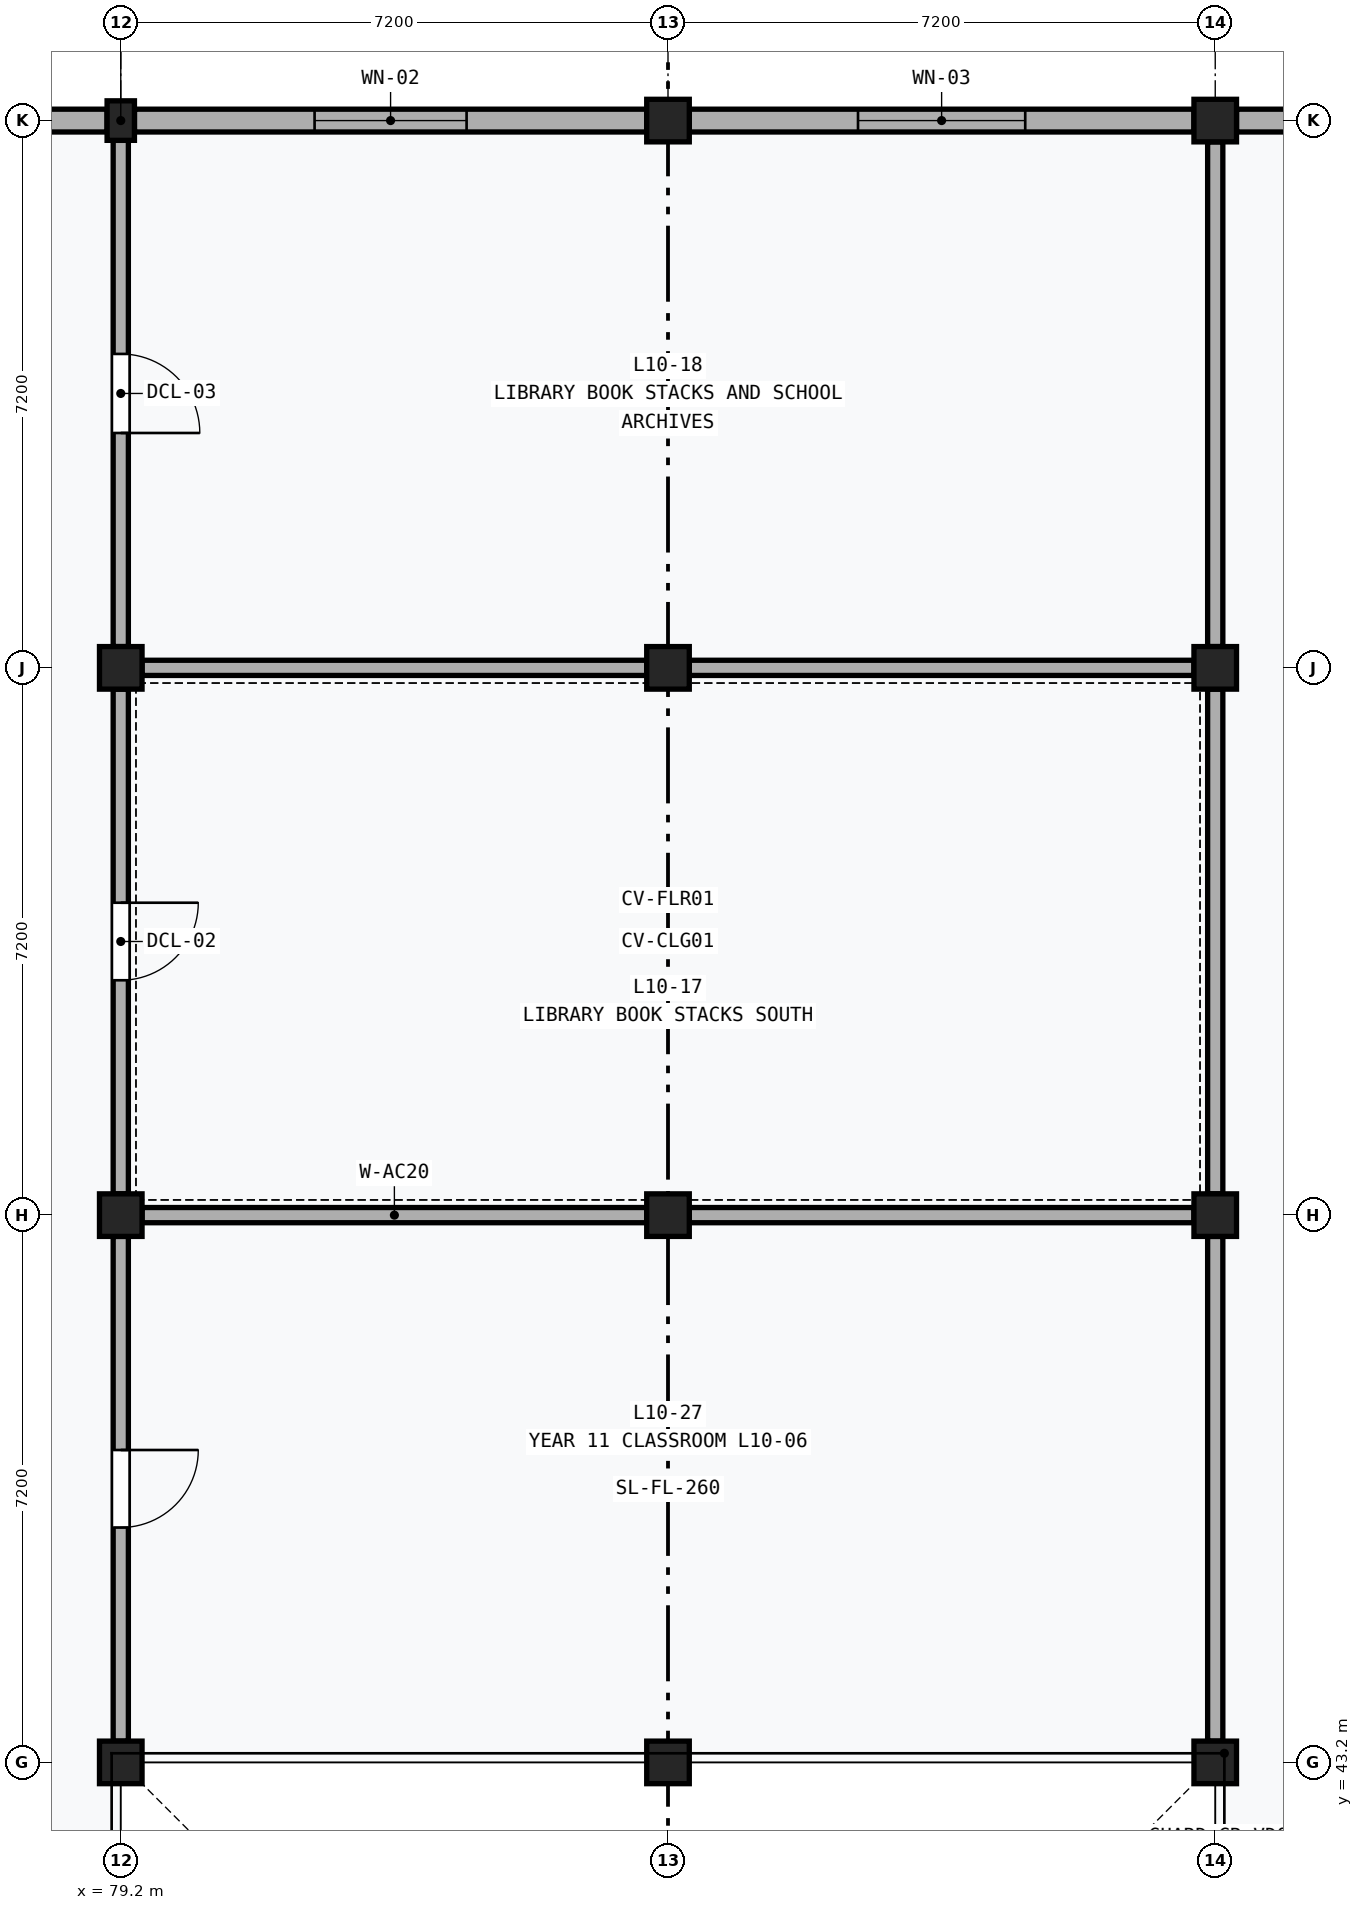
"""IFC4 building model, lengths in metres.
Left out: names, types, materials, properties, quantities, classifications, styles, units other than length and angle.
Written with IfcOpenShell. Run it as: python <this file> out.ifc"""

import sys

from ifc_helpers import new_model, si_unit, direction, frame, frame_2d, origin, origin_2d, place, context, subcontext, project, spatial, rectangle, extrude, element, fill, save


model = new_model("IFC4")
c1 = context("Model", 3, precision=1e-05, world=origin(), true_north=direction((0.0, 1.0)))
c2 = subcontext(c1, "Body", "Model", "MODEL_VIEW")
j1 = project(units=[si_unit("LENGTHUNIT", "METRE"), si_unit("PLANEANGLEUNIT", "RADIAN")], contexts=[c1])
p1 = place(None, origin())
s1 = spatial("IfcSite", under=j1, at=p1, CompositionType="ELEMENT")
p2 = place(p1, origin())
s2 = spatial("IfcBuilding", under=s1, at=p2, CompositionType="ELEMENT")
p3 = place(p2, frame((0.0, 0.0, 42.8)))
s3 = spatial("IfcBuildingStorey", under=s2, at=p3, CompositionType="ELEMENT", Elevation=42.8)
for number, where, z_axis, x_axis in (
    (1, (79.2, 43.2, 0.0), (0.0, 0.0, 1.0), (1.0, 0.0, 0.0)),
    (2, (79.2, 50.4, 0.0), (0.0, 0.0, 1.0), (1.0, 0.0, 0.0)),
    (3, (79.2, 57.6, 0.0), (0.0, 0.0, 1.0), (1.0, 0.0, 0.0)),
):
    element("IfcColumn", number, at=place(p3, frame(where, z_axis=z_axis, x_axis=x_axis)), inside=s3, PredefinedType="COLUMN", context=c2, shape_type="SweptSolid", body=[
        extrude(rectangle(XDim=0.56, YDim=0.56, at=origin_2d()), origin(), (0.0, 0.0, 1.0), 4.0),
    ])
p4 = place(p3, frame((79.2, 64.8, 0.0), z_axis=(0.0, 0.0, 1.0), x_axis=(1.0, 0.0, 0.0)))
e4 = element("IfcColumn", 4, at=p4, inside=s3, PredefinedType="PILASTER", context=c2, shape_type="SweptSolid", body=[
    extrude(rectangle(XDim=0.36, YDim=0.52, at=origin_2d()), origin(), (0.0, 0.0, 1.0), 4.0),
])
for number, where, z_axis, x_axis in (
    (5, (86.4, 43.2, 0.0), (0.0, 0.0, 1.0), (1.0, 0.0, 0.0)),
    (6, (86.4, 50.4, 0.0), (0.0, 0.0, 1.0), (1.0, 0.0, 0.0)),
    (7, (86.4, 57.6, 0.0), (0.0, 0.0, 1.0), (1.0, 0.0, 0.0)),
    (8, (86.4, 64.8, 0.0), (0.0, 0.0, 1.0), (1.0, 0.0, 0.0)),
    (9, (93.6, 43.2, 0.0), (0.0, 0.0, 1.0), (1.0, 0.0, 0.0)),
    (10, (93.6, 50.4, 0.0), (0.0, 0.0, 1.0), (1.0, 0.0, 0.0)),
    (11, (93.6, 57.6, 0.0), (0.0, 0.0, 1.0), (1.0, 0.0, 0.0)),
    (12, (93.6, 64.8, 0.0), (0.0, 0.0, 1.0), (1.0, 0.0, 0.0)),
):
    element("IfcColumn", number, at=place(p3, frame(where, z_axis=z_axis, x_axis=x_axis)), inside=s3, PredefinedType="COLUMN", context=c2, shape_type="SweptSolid", body=[
        extrude(rectangle(XDim=0.56, YDim=0.56, at=origin_2d()), origin(), (0.0, 0.0, 1.0), 4.0),
    ])
p5 = place(p3, frame((72.28, 64.8, 0.0), z_axis=(0.0, 0.0, 1.0), x_axis=(1.0, 0.0, 0.0)))
e13 = element("IfcWall", 13, at=p5, inside=s3, PredefinedType="SOLIDWALL", context=c2, shape_type="SweptSolid", body=[
    extrude(rectangle(XDim=6.74, YDim=0.3, at=frame_2d((3.37, 0.0))), origin(), (0.0, 0.0, 1.0), 3.18),
])
p6 = place(p5, frame((2.47, 0.0, 0.9)))
e14 = element("IfcOpeningElement", 14, at=p6, cuts=e13, PredefinedType="OPENING", context=c2, shape_type="SweptSolid", body=[
    extrude(rectangle(XDim=1.8, YDim=1.8, at=frame_2d((0.9, 0.9))), frame((0.0, 0.162, 0.0), z_axis=(0.0, -1.0, 0.0), x_axis=(1.0, 0.0, 0.0)), (0.0, 0.0, 1.0), 0.324),
])
p7 = place(p3, frame((79.38, 64.8, 0.0), z_axis=(0.0, 0.0, 1.0), x_axis=(1.0, 0.0, 0.0)))
e15 = element("IfcWall", 15, at=p7, inside=s3, PredefinedType="SOLIDWALL", context=c2, shape_type="SweptSolid", body=[
    extrude(rectangle(XDim=6.74, YDim=0.3, at=frame_2d((3.37, 0.0))), origin(), (0.0, 0.0, 1.0), 3.18),
])
p8 = place(p7, frame((2.37, 0.0, 0.9)))
e16 = element("IfcOpeningElement", 16, at=p8, cuts=e15, PredefinedType="OPENING", context=c2, shape_type="SweptSolid", body=[
    extrude(rectangle(XDim=2.0, YDim=1.8, at=frame_2d((1.0, 0.9))), frame((0.0, 0.162, 0.0), z_axis=(0.0, -1.0, 0.0), x_axis=(1.0, 0.0, 0.0)), (0.0, 0.0, 1.0), 0.324),
])
p9 = place(p3, frame((86.68, 64.8, 0.0), z_axis=(0.0, 0.0, 1.0), x_axis=(1.0, 0.0, 0.0)))
e17 = element("IfcWall", 17, at=p9, inside=s3, PredefinedType="SOLIDWALL", context=c2, shape_type="SweptSolid", body=[
    extrude(rectangle(XDim=6.64, YDim=0.3, at=frame_2d((3.32, 0.0))), origin(), (0.0, 0.0, 1.0), 3.18),
])
p10 = place(p9, frame((2.22, 0.0, 0.9)))
e18 = element("IfcOpeningElement", 18, at=p10, cuts=e17, PredefinedType="OPENING", context=c2, shape_type="SweptSolid", body=[
    extrude(rectangle(XDim=2.2, YDim=1.8, at=frame_2d((1.1, 0.9))), frame((0.0, 0.162, 0.0), z_axis=(0.0, -1.0, 0.0), x_axis=(1.0, 0.0, 0.0)), (0.0, 0.0, 1.0), 0.324),
])
p11 = place(p3, frame((93.88, 64.8, 0.0), z_axis=(0.0, 0.0, 1.0), x_axis=(1.0, 0.0, 0.0)))
e19 = element("IfcWall", 19, at=p11, inside=s3, PredefinedType="SOLIDWALL", context=c2, shape_type="SweptSolid", body=[
    extrude(rectangle(XDim=6.64, YDim=0.3, at=frame_2d((3.32, 0.0))), origin(), (0.0, 0.0, 1.0), 3.18),
])
p12 = place(p11, frame((2.12, 0.0, 0.9)))
e20 = element("IfcOpeningElement", 20, at=p12, cuts=e19, PredefinedType="OPENING", context=c2, shape_type="SweptSolid", body=[
    extrude(rectangle(XDim=2.4, YDim=1.8, at=frame_2d((1.2, 0.9))), frame((0.0, 0.162, 0.0), z_axis=(0.0, -1.0, 0.0), x_axis=(1.0, 0.0, 0.0)), (0.0, 0.0, 1.0), 0.324),
])
for number, where, z_axis, x_axis in (
    (21, (79.48, 50.4, 0.0), (0.0, 0.0, 1.0), (1.0, 0.0, 0.0)),
    (22, (79.48, 57.6, 0.0), (0.0, 0.0, 1.0), (1.0, 0.0, 0.0)),
):
    element("IfcWall", number, at=place(p3, frame(where, z_axis=z_axis, x_axis=x_axis)), inside=s3, PredefinedType="PARTITIONING", context=c2, shape_type="SweptSolid", body=[
        extrude(rectangle(XDim=6.64, YDim=0.2, at=frame_2d((3.32, 0.0))), origin(), (0.0, 0.0, 1.0), 3.02),
    ])
p13 = place(p3, frame((79.2, 50.68, 0.0), z_axis=(0.0, 0.0, 1.0), x_axis=(0.0, 1.0, 0.0)))
e23 = element("IfcWall", 23, at=p13, inside=s3, PredefinedType="PARTITIONING", context=c2, shape_type="SweptSolid", body=[
    extrude(rectangle(XDim=6.64, YDim=0.2, at=frame_2d((3.32, 0.0))), origin(), (0.0, 0.0, 1.0), 3.02),
])
p14 = place(p13, frame((2.81, 0.0, 0.0)))
e24 = element("IfcOpeningElement", 24, at=p14, cuts=e23, PredefinedType="OPENING", context=c2, shape_type="SweptSolid", body=[
    extrude(rectangle(XDim=1.02, YDim=2.12, at=frame_2d((0.51, 1.06))), frame((0.0, 0.112, 0.0), z_axis=(0.0, -1.0, 0.0), x_axis=(1.0, 0.0, 0.0)), (0.0, 0.0, 1.0), 0.224),
])
for number, where, z_axis, x_axis in (
    (25, (86.68, 50.4, 0.0), (0.0, 0.0, 1.0), (1.0, 0.0, 0.0)),
    (26, (86.68, 57.6, 0.0), (0.0, 0.0, 1.0), (1.0, 0.0, 0.0)),
    (27, (93.6, 50.68, 0.0), (0.0, 0.0, 1.0), (0.0, 1.0, 0.0)),
):
    element("IfcWall", number, at=place(p3, frame(where, z_axis=z_axis, x_axis=x_axis)), inside=s3, PredefinedType="PARTITIONING", context=c2, shape_type="SweptSolid", body=[
        extrude(rectangle(XDim=6.64, YDim=0.2, at=frame_2d((3.32, 0.0))), origin(), (0.0, 0.0, 1.0), 3.02),
    ])
p15 = place(p3, frame((79.2, 57.88, 0.0), z_axis=(0.0, 0.0, 1.0), x_axis=(0.0, 1.0, 0.0)))
e28 = element("IfcWall", 28, at=p15, inside=s3, PredefinedType="PARTITIONING", context=c2, shape_type="SweptSolid", body=[
    extrude(rectangle(XDim=6.66, YDim=0.2, at=frame_2d((3.33, 0.0))), origin(), (0.0, 0.0, 1.0), 3.02),
])
p16 = place(p15, frame((2.81, 0.0, 0.0)))
e29 = element("IfcOpeningElement", 29, at=p16, cuts=e28, PredefinedType="OPENING", context=c2, shape_type="SweptSolid", body=[
    extrude(rectangle(XDim=1.04, YDim=2.14, at=frame_2d((0.52, 1.07))), frame((0.0, 0.112, 0.0), z_axis=(0.0, -1.0, 0.0), x_axis=(1.0, 0.0, 0.0)), (0.0, 0.0, 1.0), 0.224),
])
p17 = place(p3, frame((93.6, 57.88, 0.0), z_axis=(0.0, 0.0, 1.0), x_axis=(0.0, 1.0, 0.0)))
e30 = element("IfcWall", 30, at=p17, inside=s3, PredefinedType="PARTITIONING", context=c2, shape_type="SweptSolid", body=[
    extrude(rectangle(XDim=6.64, YDim=0.2, at=frame_2d((3.32, 0.0))), origin(), (0.0, 0.0, 1.0), 3.02),
])
p18 = place(p3, frame((79.2, 43.48, 0.0), z_axis=(0.0, 0.0, 1.0), x_axis=(0.0, 1.0, 0.0)))
e31 = element("IfcWall", 31, at=p18, inside=s3, PredefinedType="PARTITIONING", context=c2, shape_type="SweptSolid", body=[
    extrude(rectangle(XDim=6.64, YDim=0.2, at=frame_2d((3.32, 0.0))), origin(), (0.0, 0.0, 1.0), 3.02),
])
p19 = place(p18, frame((2.81, 0.0, 0.0)))
e32 = element("IfcOpeningElement", 32, at=p19, cuts=e31, PredefinedType="OPENING", context=c2, shape_type="SweptSolid", body=[
    extrude(rectangle(XDim=1.02, YDim=2.12, at=frame_2d((0.51, 1.06))), frame((0.0, 0.112, 0.0), z_axis=(0.0, -1.0, 0.0), x_axis=(1.0, 0.0, 0.0)), (0.0, 0.0, 1.0), 0.224),
])
p20 = place(p3, frame((93.6, 43.48, 0.0), z_axis=(0.0, 0.0, 1.0), x_axis=(0.0, 1.0, 0.0)))
e33 = element("IfcWall", 33, at=p20, inside=s3, PredefinedType="PARTITIONING", context=c2, shape_type="SweptSolid", body=[
    extrude(rectangle(XDim=6.64, YDim=0.2, at=frame_2d((3.32, 0.0))), origin(), (0.0, 0.0, 1.0), 3.02),
])
p21 = place(p8, origin())
e34 = element("IfcWindow", 34, at=p21, inside=s3, PartitioningType="SINGLE_PANEL", PredefinedType="WINDOW", context=c2, shape_type="SweptSolid", body=[
    extrude(rectangle(XDim=2.0, YDim=1.8, at=frame_2d((1.0, 0.9))), frame((0.0, 0.03, 0.0), z_axis=(0.0, -1.0, 0.0), x_axis=(1.0, 0.0, 0.0)), (0.0, 0.0, 1.0), 0.06),
])
fill(e16, e34)
p22 = place(p10, origin())
e35 = element("IfcWindow", 35, at=p22, inside=s3, PartitioningType="SINGLE_PANEL", PredefinedType="WINDOW", context=c2, shape_type="SweptSolid", body=[
    extrude(rectangle(XDim=2.2, YDim=1.8, at=frame_2d((1.1, 0.9))), frame((0.0, 0.03, 0.0), z_axis=(0.0, -1.0, 0.0), x_axis=(1.0, 0.0, 0.0)), (0.0, 0.0, 1.0), 0.06),
])
fill(e18, e35)
p23 = place(p14, frame((1.02, 0.0, 0.0), z_axis=(0.0, 0.0, 1.0), x_axis=(-1.0, 0.0, 0.0)))
e36 = element("IfcDoor", 36, at=p23, inside=s3, OperationType="SINGLE_SWING_LEFT", PredefinedType="DOOR", context=c2, shape_type="SweptSolid", body=[
    extrude(rectangle(XDim=1.02, YDim=2.12, at=frame_2d((0.51, 1.06))), frame((0.0, 0.025, 0.0), z_axis=(0.0, -1.0, 0.0), x_axis=(1.0, 0.0, 0.0)), (0.0, 0.0, 1.0), 0.05),
])
fill(e24, e36)
p24 = place(p16, frame((1.04, 0.0, 0.0), z_axis=(0.0, 0.0, 1.0), x_axis=(-1.0, 0.0, 0.0)))
e37 = element("IfcDoor", 37, at=p24, inside=s3, OperationType="SINGLE_SWING_RIGHT", PredefinedType="DOOR", context=c2, shape_type="SweptSolid", body=[
    extrude(rectangle(XDim=1.04, YDim=2.14, at=frame_2d((0.52, 1.07))), frame((0.0, 0.025, 0.0), z_axis=(0.0, -1.0, 0.0), x_axis=(1.0, 0.0, 0.0)), (0.0, 0.0, 1.0), 0.05),
])
fill(e29, e37)
p25 = place(p19, frame((1.02, 0.0, 0.0), z_axis=(0.0, 0.0, 1.0), x_axis=(-1.0, 0.0, 0.0)))
e38 = element("IfcDoor", 38, at=p25, inside=s3, OperationType="SINGLE_SWING_LEFT", PredefinedType="DOOR", context=c2, shape_type="SweptSolid", body=[
    extrude(rectangle(XDim=1.02, YDim=2.12, at=frame_2d((0.51, 1.06))), frame((0.0, 0.025, 0.0), z_axis=(0.0, -1.0, 0.0), x_axis=(1.0, 0.0, 0.0)), (0.0, 0.0, 1.0), 0.05),
])
fill(e32, e38)
save(model, sys.argv[1])
